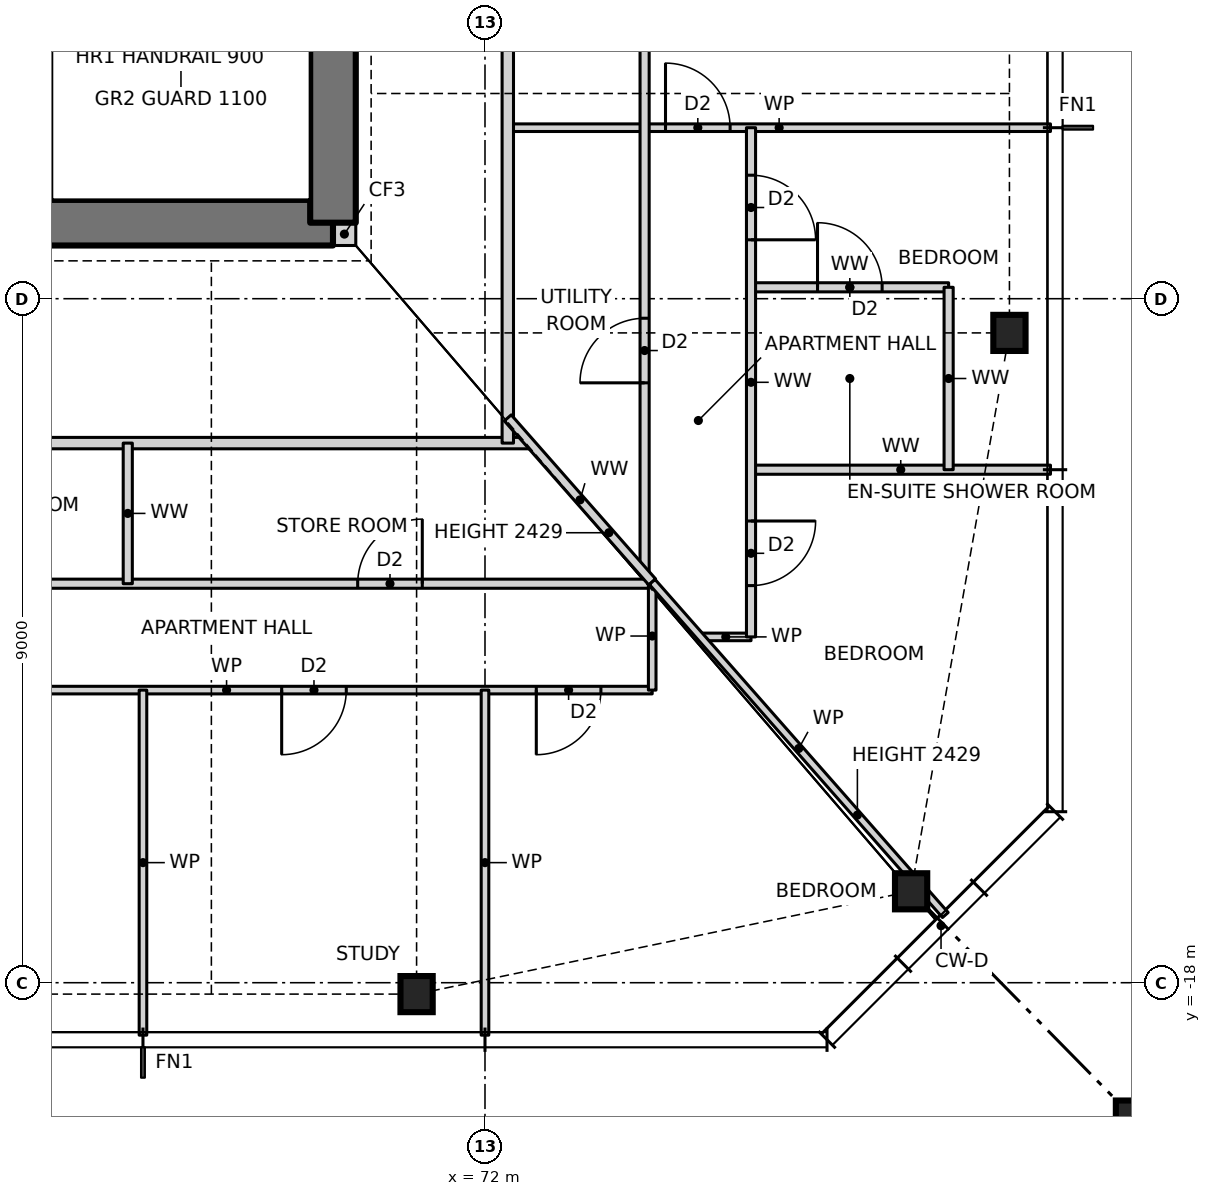
"""IFC4 building model, lengths in metres.
Left out: names, types, materials, properties, quantities, classifications, styles, units other than length and angle.
Written with IfcOpenShell. Run it as: python <this file> out.ifc"""

import sys

from ifc_helpers import new_model, si_unit, direction, frame, frame_2d, origin, origin_2d, place, context, subcontext, project, spatial, rectangle, hollow_rectangle, i_section, extrude, element, fill, save


model = new_model("IFC4")
c1 = context("Model", 3, precision=1e-05, world=origin(), true_north=direction((0.0, 1.0)))
c2 = subcontext(c1, "Body", "Model", "MODEL_VIEW")
j1 = project(units=[si_unit("LENGTHUNIT", "METRE"), si_unit("PLANEANGLEUNIT", "RADIAN")], contexts=[c1])
p1 = place(None, origin())
s1 = spatial("IfcSite", under=j1, at=p1, CompositionType="ELEMENT")
p2 = place(p1, origin())
s2 = spatial("IfcBuilding", under=s1, at=p2, CompositionType="ELEMENT")
p3 = place(p2, frame((0.0, 0.0, 22.0)))
s3 = spatial("IfcBuildingStorey", under=s2, at=p3, CompositionType="ELEMENT", Elevation=22.0)
for number, where, z_axis, x_axis in (
    (1, (71.1, -18.15, 0.0), (0.0, 0.0, 1.0), (1.0, 0.0, 0.0)),
    (2, (77.606, -16.797, 0.0), (0.0, 0.0, 1.0), (1.0, 0.0, 0.0)),
    (3, (78.9, -9.45, 0.0), (0.0, 0.0, 1.0), (1.0, 0.0, 0.0)),
):
    element("IfcColumn", number, at=place(p3, frame(where, z_axis=z_axis, x_axis=x_axis)), inside=s3, PredefinedType="COLUMN", context=c2, shape_type="SweptSolid", body=[
        extrude(i_section(OverallWidth=0.424, OverallDepth=0.475, WebThickness=0.048, FlangeThickness=0.077, at=origin_2d()), origin(), (0.0, 0.0, 1.0), 3.5),
    ])
p4 = place(p3, frame((80.9, -20.15, 0.0), z_axis=(0.0, 0.0, 1.0), x_axis=(1.0, 0.0, 0.0)))
e4 = element("IfcColumn", 4, at=p4, inside=s3, PredefinedType="COLUMN", context=c2, shape_type="SweptSolid", body=[
    extrude(hollow_rectangle(XDim=1.2, YDim=1.2, WallThickness=0.07, at=origin_2d()), origin(), (0.0, 0.0, 1.0), 3.5),
])
p5 = place(p3, frame((70.0, -8.15, 0.0), z_axis=(0.0, 0.0, 1.0), x_axis=(1.0, 0.0, 0.0)))
e5 = element("IfcWall", 5, at=p5, inside=s3, PredefinedType="SOLIDWALL", context=c2, shape_type="SweptSolid", body=[
    extrude(rectangle(XDim=0.3, YDim=0.3, at=frame_2d((0.15, 0.0))), origin(), (0.0, 0.0, 1.0), 3.5),
])
p6 = place(p3, frame((56.0, -8.0, 0.0), z_axis=(0.0, 0.0, 1.0), x_axis=(1.0, 0.0, 0.0)))
e6 = element("IfcWall", 6, at=p6, inside=s3, PredefinedType="SHEAR", context=c2, shape_type="SweptSolid", body=[
    extrude(rectangle(XDim=14.0, YDim=0.6, at=frame_2d((7.0, 0.0))), origin(), (0.0, 0.0, 1.0), 3.5),
])
p7 = place(p6, frame((2.7, 0.0, 0.0)))
e7 = element("IfcOpeningElement", 7, at=p7, cuts=e6, PredefinedType="OPENING", context=c2, shape_type="SweptSolid", body=[
    extrude(rectangle(XDim=0.9, YDim=2.1, at=frame_2d((0.45, 1.05))), frame((0.0, 0.31, 0.0), z_axis=(0.0, -1.0, 0.0), x_axis=(1.0, 0.0, 0.0)), (0.0, 0.0, 1.0), 0.62),
])
p8 = place(p6, frame((7.7, 0.0, 0.0)))
e8 = element("IfcOpeningElement", 8, at=p8, cuts=e6, PredefinedType="OPENING", context=c2, shape_type="SweptSolid", body=[
    extrude(rectangle(XDim=0.9, YDim=2.1, at=frame_2d((0.45, 1.05))), frame((0.0, 0.31, 0.0), z_axis=(0.0, -1.0, 0.0), x_axis=(1.0, 0.0, 0.0)), (0.0, 0.0, 1.0), 0.62),
])
p9 = place(p3, frame((70.0, -8.0, 0.0), z_axis=(0.0, 0.0, 1.0), x_axis=(0.0, 1.0, 0.0)))
e9 = element("IfcWall", 9, at=p9, inside=s3, PredefinedType="SHEAR", context=c2, shape_type="SweptSolid", body=[
    extrude(rectangle(XDim=16.0, YDim=0.6, at=frame_2d((8.0, 0.0))), origin(), (0.0, 0.0, 1.0), 3.5),
])
p10 = place(p9, frame((7.5, 0.0, 0.0)))
e10 = element("IfcOpeningElement", 10, at=p10, cuts=e9, PredefinedType="OPENING", context=c2, shape_type="SweptSolid", body=[
    extrude(rectangle(XDim=1.0, YDim=2.1, at=frame_2d((0.5, 1.05))), frame((0.0, 0.31, 0.0), z_axis=(0.0, -1.0, 0.0), x_axis=(1.0, 0.0, 0.0)), (0.0, 0.0, 1.0), 0.62),
])
p11 = place(p3, frame((63.0, -14.15, 0.0), z_axis=(0.0, 0.0, 1.0), x_axis=(1.0, 0.0, 0.0)))
e11 = element("IfcWall", 11, at=p11, inside=s3, PredefinedType="PARTITIONING", context=c2, shape_type="SweptSolid", body=[
    extrude(rectangle(XDim=11.2, YDim=0.1, at=frame_2d((5.6, 0.0))), origin(), (0.0, 0.0, 1.0), 3.27),
])
p12 = place(p11, frame((1.825, 0.0, 0.0)))
e12 = element("IfcOpeningElement", 12, at=p12, cuts=e11, PredefinedType="OPENING", context=c2, shape_type="SweptSolid", body=[
    extrude(rectangle(XDim=0.85, YDim=2.1, at=frame_2d((0.425, 1.05))), frame((0.0, 0.06, 0.0), z_axis=(0.0, -1.0, 0.0), x_axis=(1.0, 0.0, 0.0)), (0.0, 0.0, 1.0), 0.12),
])
p13 = place(p11, frame((6.325, 0.0, 0.0)))
e13 = element("IfcOpeningElement", 13, at=p13, cuts=e11, PredefinedType="OPENING", context=c2, shape_type="SweptSolid", body=[
    extrude(rectangle(XDim=0.85, YDim=2.1, at=frame_2d((0.425, 1.05))), frame((0.0, 0.06, 0.0), z_axis=(0.0, -1.0, 0.0), x_axis=(1.0, 0.0, 0.0)), (0.0, 0.0, 1.0), 0.12),
])
p14 = place(p11, frame((9.675, 0.0, 0.0)))
e14 = element("IfcOpeningElement", 14, at=p14, cuts=e11, PredefinedType="OPENING", context=c2, shape_type="SweptSolid", body=[
    extrude(rectangle(XDim=0.85, YDim=2.1, at=frame_2d((0.425, 1.05))), frame((0.0, 0.06, 0.0), z_axis=(0.0, -1.0, 0.0), x_axis=(1.0, 0.0, 0.0)), (0.0, 0.0, 1.0), 0.12),
])
p15 = place(p3, frame((74.836, -13.45, 0.0), z_axis=(0.0, 0.0, 1.0), x_axis=(1.0, 0.0, 0.0)))
e15 = element("IfcWall", 15, at=p15, inside=s3, PredefinedType="PARTITIONING", context=c2, shape_type="SweptSolid", body=[
    extrude(rectangle(XDim=0.664, YDim=0.1, at=frame_2d((0.332, 0.0))), origin(), (0.0, 0.0, 1.0), 3.27),
])
p16 = place(p3, frame((54.0, -12.75, 0.0), z_axis=(0.0, 0.0, 1.0), x_axis=(1.0, 0.0, 0.0)))
e16 = element("IfcWall", 16, at=p16, inside=s3, PredefinedType="PARTITIONING", context=c2, shape_type="SweptSolid", body=[
    extrude(rectangle(XDim=20.2, YDim=0.12, at=frame_2d((10.1, 0.0))), origin(), (0.0, 0.0, 1.0), 3.27),
])
p17 = place(p16, frame((1.375, 0.0, 0.0)))
e17 = element("IfcOpeningElement", 17, at=p17, cuts=e16, PredefinedType="OPENING", context=c2, shape_type="SweptSolid", body=[
    extrude(rectangle(XDim=0.85, YDim=2.1, at=frame_2d((0.425, 1.05))), frame((0.0, 0.07, 0.0), z_axis=(0.0, -1.0, 0.0), x_axis=(1.0, 0.0, 0.0)), (0.0, 0.0, 1.0), 0.14),
])
p18 = place(p16, frame((4.575, 0.0, 0.0)))
e18 = element("IfcOpeningElement", 18, at=p18, cuts=e16, PredefinedType="OPENING", context=c2, shape_type="SweptSolid", body=[
    extrude(rectangle(XDim=0.85, YDim=2.1, at=frame_2d((0.425, 1.05))), frame((0.0, 0.07, 0.0), z_axis=(0.0, -1.0, 0.0), x_axis=(1.0, 0.0, 0.0)), (0.0, 0.0, 1.0), 0.14),
])
p19 = place(p16, frame((10.725, 0.0, 0.0)))
e19 = element("IfcOpeningElement", 19, at=p19, cuts=e16, PredefinedType="OPENING", context=c2, shape_type="SweptSolid", body=[
    extrude(rectangle(XDim=0.85, YDim=2.1, at=frame_2d((0.425, 1.05))), frame((0.0, 0.07, 0.0), z_axis=(0.0, -1.0, 0.0), x_axis=(1.0, 0.0, 0.0)), (0.0, 0.0, 1.0), 0.14),
])
p20 = place(p16, frame((16.325, 0.0, 0.0)))
e20 = element("IfcOpeningElement", 20, at=p20, cuts=e16, PredefinedType="OPENING", context=c2, shape_type="SweptSolid", body=[
    extrude(rectangle(XDim=0.85, YDim=2.1, at=frame_2d((0.425, 1.05))), frame((0.0, 0.07, 0.0), z_axis=(0.0, -1.0, 0.0), x_axis=(1.0, 0.0, 0.0)), (0.0, 0.0, 1.0), 0.14),
])
p21 = place(p3, frame((75.5, -11.25, 0.0), z_axis=(0.0, 0.0, 1.0), x_axis=(1.0, 0.0, 0.0)))
e21 = element("IfcWall", 21, at=p21, inside=s3, PredefinedType="PARTITIONING", context=c2, shape_type="SweptSolid", body=[
    extrude(rectangle(XDim=3.94, YDim=0.12, at=frame_2d((1.97, 0.0))), origin(), (0.0, 0.0, 1.0), 3.27),
])
p22 = place(p3, frame((53.408, -10.9, 0.0), z_axis=(0.0, 0.0, 1.0), x_axis=(1.0, 0.0, 0.0)))
e22 = element("IfcWall", 22, at=p22, inside=s3, PredefinedType="PARTITIONING", context=c2, shape_type="SweptSolid", body=[
    extrude(rectangle(XDim=19.184, YDim=0.15, at=frame_2d((9.592, 0.0))), origin(), (0.0, 0.0, 1.0), 3.27),
])
p23 = place(p22, frame((5.092, 0.0, 0.0)))
e23 = element("IfcOpeningElement", 23, at=p23, cuts=e22, PredefinedType="OPENING", context=c2, shape_type="SweptSolid", body=[
    extrude(rectangle(XDim=1.0, YDim=2.1, at=frame_2d((0.5, 1.05))), frame((0.0, 0.085, 0.0), z_axis=(0.0, -1.0, 0.0), x_axis=(1.0, 0.0, 0.0)), (0.0, 0.0, 1.0), 0.17),
])
p24 = place(p3, frame((75.5, -8.85, 0.0), z_axis=(0.0, 0.0, 1.0), x_axis=(1.0, 0.0, 0.0)))
e24 = element("IfcWall", 24, at=p24, inside=s3, PredefinedType="PARTITIONING", context=c2, shape_type="SweptSolid", body=[
    extrude(rectangle(XDim=2.6, YDim=0.12, at=frame_2d((1.3, 0.0))), origin(), (0.0, 0.0, 1.0), 3.27),
])
p25 = place(p24, frame((0.875, 0.0, 0.0)))
e25 = element("IfcOpeningElement", 25, at=p25, cuts=e24, PredefinedType="OPENING", context=c2, shape_type="SweptSolid", body=[
    extrude(rectangle(XDim=0.85, YDim=2.1, at=frame_2d((0.425, 1.05))), frame((0.0, 0.07, 0.0), z_axis=(0.0, -1.0, 0.0), x_axis=(1.0, 0.0, 0.0)), (0.0, 0.0, 1.0), 0.14),
])
p26 = place(p3, frame((72.3, -6.75, 0.0), z_axis=(0.0, 0.0, 1.0), x_axis=(1.0, 0.0, 0.0)))
e26 = element("IfcWall", 26, at=p26, inside=s3, PredefinedType="PARTITIONING", context=c2, shape_type="SweptSolid", body=[
    extrude(rectangle(XDim=7.14, YDim=0.1, at=frame_2d((3.57, 0.0))), origin(), (0.0, 0.0, 1.0), 3.27),
])
p27 = place(p26, frame((2.075, 0.0, 0.0)))
e27 = element("IfcOpeningElement", 27, at=p27, cuts=e26, PredefinedType="OPENING", context=c2, shape_type="SweptSolid", body=[
    extrude(rectangle(XDim=0.85, YDim=2.1, at=frame_2d((0.425, 1.05))), frame((0.0, 0.06, 0.0), z_axis=(0.0, -1.0, 0.0), x_axis=(1.0, 0.0, 0.0)), (0.0, 0.0, 1.0), 0.12),
])
p28 = place(p3, frame((78.1, -11.25, 0.0), z_axis=(0.0, 0.0, 1.0), x_axis=(0.0, 1.0, 0.0)))
e28 = element("IfcWall", 28, at=p28, inside=s3, PredefinedType="PARTITIONING", context=c2, shape_type="SweptSolid", body=[
    extrude(rectangle(XDim=2.4, YDim=0.12, at=frame_2d((1.2, 0.0))), origin(), (0.0, 0.0, 1.0), 3.27),
])
p29 = place(p3, frame((75.5, -13.45, 0.0), z_axis=(0.0, 0.0, 1.0), x_axis=(0.0, 1.0, 0.0)))
e29 = element("IfcWall", 29, at=p29, inside=s3, PredefinedType="PARTITIONING", context=c2, shape_type="SweptSolid", body=[
    extrude(rectangle(XDim=6.7, YDim=0.12, at=frame_2d((3.35, 0.0))), origin(), (0.0, 0.0, 1.0), 3.27),
])
p30 = place(p29, frame((5.225, 0.0, 0.0)))
e30 = element("IfcOpeningElement", 30, at=p30, cuts=e29, PredefinedType="OPENING", context=c2, shape_type="SweptSolid", body=[
    extrude(rectangle(XDim=0.85, YDim=2.1, at=frame_2d((0.425, 1.05))), frame((0.0, 0.07, 0.0), z_axis=(0.0, -1.0, 0.0), x_axis=(1.0, 0.0, 0.0)), (0.0, 0.0, 1.0), 0.14),
])
p31 = place(p29, frame((0.675, 0.0, 0.0)))
e31 = element("IfcOpeningElement", 31, at=p31, cuts=e29, PredefinedType="OPENING", context=c2, shape_type="SweptSolid", body=[
    extrude(rectangle(XDim=0.85, YDim=2.1, at=frame_2d((0.425, 1.05))), frame((0.0, 0.07, 0.0), z_axis=(0.0, -1.0, 0.0), x_axis=(1.0, 0.0, 0.0)), (0.0, 0.0, 1.0), 0.14),
])
p32 = place(p3, frame((74.2, -14.15, 0.0), z_axis=(0.0, 0.0, 1.0), x_axis=(0.0, 1.0, 0.0)))
e32 = element("IfcWall", 32, at=p32, inside=s3, PredefinedType="PARTITIONING", context=c2, shape_type="SweptSolid", body=[
    extrude(rectangle(XDim=1.423, YDim=0.1, at=frame_2d((0.711, 0.0))), origin(), (0.0, 0.0, 1.0), 3.27),
])
p33 = place(p3, frame((74.1, -12.614, 0.0), z_axis=(0.0, 0.0, 1.0), x_axis=(0.0, 1.0, 0.0)))
e33 = element("IfcWall", 33, at=p33, inside=s3, PredefinedType="PARTITIONING", context=c2, shape_type="SweptSolid", body=[
    extrude(rectangle(XDim=25.228, YDim=0.12, at=frame_2d((12.614, 0.0))), origin(), (0.0, 0.0, 1.0), 3.27),
])
p34 = place(p33, frame((7.239, 0.0, 0.0)))
e34 = element("IfcOpeningElement", 34, at=p34, cuts=e33, PredefinedType="OPENING", context=c2, shape_type="SweptSolid", body=[
    extrude(rectangle(XDim=0.85, YDim=2.1, at=frame_2d((0.425, 1.05))), frame((0.0, 0.07, 0.0), z_axis=(0.0, -1.0, 0.0), x_axis=(1.0, 0.0, 0.0)), (0.0, 0.0, 1.0), 0.14),
])
p35 = place(p33, frame((10.439, 0.0, 0.0)))
e35 = element("IfcOpeningElement", 35, at=p35, cuts=e33, PredefinedType="OPENING", context=c2, shape_type="SweptSolid", body=[
    extrude(rectangle(XDim=0.85, YDim=2.1, at=frame_2d((0.425, 1.05))), frame((0.0, 0.07, 0.0), z_axis=(0.0, -1.0, 0.0), x_axis=(1.0, 0.0, 0.0)), (0.0, 0.0, 1.0), 0.14),
])
p36 = place(p33, frame((2.507, 0.0, 0.0)))
e36 = element("IfcOpeningElement", 36, at=p36, cuts=e33, PredefinedType="OPENING", context=c2, shape_type="SweptSolid", body=[
    extrude(rectangle(XDim=0.85, YDim=2.1, at=frame_2d((0.425, 1.05))), frame((0.0, 0.07, 0.0), z_axis=(0.0, -1.0, 0.0), x_axis=(1.0, 0.0, 0.0)), (0.0, 0.0, 1.0), 0.14),
])
p37 = place(p33, frame((16.639, 0.0, 0.0)))
e37 = element("IfcOpeningElement", 37, at=p37, cuts=e33, PredefinedType="OPENING", context=c2, shape_type="SweptSolid", body=[
    extrude(rectangle(XDim=0.85, YDim=2.1, at=frame_2d((0.425, 1.05))), frame((0.0, 0.07, 0.0), z_axis=(0.0, -1.0, 0.0), x_axis=(1.0, 0.0, 0.0)), (0.0, 0.0, 1.0), 0.14),
])
p38 = place(p33, frame((21.821, 0.0, 0.0)))
e38 = element("IfcOpeningElement", 38, at=p38, cuts=e33, PredefinedType="OPENING", context=c2, shape_type="SweptSolid", body=[
    extrude(rectangle(XDim=0.85, YDim=2.1, at=frame_2d((0.425, 1.05))), frame((0.0, 0.07, 0.0), z_axis=(0.0, -1.0, 0.0), x_axis=(1.0, 0.0, 0.0)), (0.0, 0.0, 1.0), 0.14),
])
p39 = place(p3, frame((72.3, -10.9, 0.0), z_axis=(0.0, 0.0, 1.0), x_axis=(0.0, 1.0, 0.0)))
e39 = element("IfcWall", 39, at=p39, inside=s3, PredefinedType="PARTITIONING", context=c2, shape_type="SweptSolid", body=[
    extrude(rectangle(XDim=21.468, YDim=0.15, at=frame_2d((10.734, 0.0))), origin(), (0.0, 0.0, 1.0), 3.27),
])
p40 = place(p39, frame((8.65, 0.0, 0.0)))
e40 = element("IfcOpeningElement", 40, at=p40, cuts=e39, PredefinedType="OPENING", context=c2, shape_type="SweptSolid", body=[
    extrude(rectangle(XDim=1.0, YDim=2.1, at=frame_2d((0.5, 1.05))), frame((0.0, 0.085, 0.0), z_axis=(0.0, -1.0, 0.0), x_axis=(1.0, 0.0, 0.0)), (0.0, 0.0, 1.0), 0.17),
])
for number, where, z_axis, x_axis in (
    (41, (72.0, -18.69, 0.0), (0.0, 0.0, 1.0), (0.0, 1.0, 0.0)),
    (42, (67.5, -18.69, 0.0), (0.0, 0.0, 1.0), (0.0, 1.0, 0.0)),
):
    element("IfcWall", number, at=place(p3, frame(where, z_axis=z_axis, x_axis=x_axis)), inside=s3, PredefinedType="PARTITIONING", context=c2, shape_type="SweptSolid", body=[
        extrude(rectangle(XDim=4.54, YDim=0.1, at=frame_2d((2.27, 0.0))), origin(), (0.0, 0.0, 1.0), 3.27),
    ])
p41 = place(p3, frame((67.3, -12.75, 0.0), z_axis=(0.0, 0.0, 1.0), x_axis=(0.0, 1.0, 0.0)))
e43 = element("IfcWall", 43, at=p41, inside=s3, PredefinedType="PARTITIONING", context=c2, shape_type="SweptSolid", body=[
    extrude(rectangle(XDim=1.85, YDim=0.12, at=frame_2d((0.925, 0.0))), origin(), (0.0, 0.0, 1.0), 3.27),
])
p42 = place(p3, frame((66.3, -7.64, 0.0), z_axis=(0.0, 0.0, 1.0), x_axis=(0.0, 1.0, 0.0)))
e44 = element("IfcWall", 44, at=p42, inside=s3, PredefinedType="SOLIDWALL", context=c2, shape_type="SweptSolid", body=[
    extrude(rectangle(XDim=11.49, YDim=0.2, at=frame_2d((5.745, 0.0))), origin(), (0.0, 0.0, 1.0), 3.5),
])
p43 = place(p42, frame((7.04, 0.0, 0.0)))
e45 = element("IfcOpeningElement", 45, at=p43, cuts=e44, PredefinedType="OPENING", context=c2, shape_type="SweptSolid", body=[
    extrude(rectangle(XDim=1.2, YDim=2.1, at=frame_2d((0.6, 1.05))), frame((0.0, 0.11, 0.0), z_axis=(0.0, -1.0, 0.0), x_axis=(1.0, 0.0, 0.0)), (0.0, 0.0, 1.0), 0.22),
])
p44 = place(p3, frame((74.2, -12.727, 0.0), z_axis=(0.0, 0.0, 1.0), x_axis=(-0.66059344937, 0.75074382758, 0.0)))
e46 = element("IfcWall", 46, at=p44, inside=s3, PredefinedType="PARTITIONING", context=c2, shape_type="SweptSolid", body=[
    extrude(rectangle(XDim=2.876, YDim=0.12, at=frame_2d((1.438, 0.0))), origin(), (0.0, 0.0, 1.0), 2.429),
])
p45 = place(p3, frame((78.057, -17.109, 0.0), z_axis=(0.0, 0.0, 1.0), x_axis=(-0.660654290516, 0.750690287951, 0.0)))
e47 = element("IfcWall", 47, at=p45, inside=s3, PredefinedType="PARTITIONING", context=c2, shape_type="SweptSolid", body=[
    extrude(rectangle(XDim=5.838, YDim=0.1, at=frame_2d((2.919, 0.0))), origin(), (0.0, 0.0, 1.0), 2.429),
])
p46 = place(p13, frame((0.85, 0.0, 0.0), z_axis=(0.0, 0.0, 1.0), x_axis=(-1.0, 0.0, 0.0)))
e48 = element("IfcDoor", 48, at=p46, inside=s3, OperationType="SINGLE_SWING_RIGHT", PredefinedType="DOOR", context=c2, shape_type="SweptSolid", body=[
    extrude(rectangle(XDim=0.85, YDim=2.1, at=frame_2d((0.425, 1.05))), frame((0.0, 0.025, 0.0), z_axis=(0.0, -1.0, 0.0), x_axis=(1.0, 0.0, 0.0)), (0.0, 0.0, 1.0), 0.05),
])
fill(e13, e48)
p47 = place(p14, frame((0.85, 0.0, 0.0), z_axis=(0.0, 0.0, 1.0), x_axis=(-1.0, 0.0, 0.0)))
e49 = element("IfcDoor", 49, at=p47, inside=s3, OperationType="SINGLE_SWING_RIGHT", PredefinedType="DOOR", context=c2, shape_type="SweptSolid", body=[
    extrude(rectangle(XDim=0.85, YDim=2.1, at=frame_2d((0.425, 1.05))), frame((0.0, 0.025, 0.0), z_axis=(0.0, -1.0, 0.0), x_axis=(1.0, 0.0, 0.0)), (0.0, 0.0, 1.0), 0.05),
])
fill(e14, e49)
p48 = place(p20, origin())
e50 = element("IfcDoor", 50, at=p48, inside=s3, OperationType="SINGLE_SWING_RIGHT", PredefinedType="DOOR", context=c2, shape_type="SweptSolid", body=[
    extrude(rectangle(XDim=0.85, YDim=2.1, at=frame_2d((0.425, 1.05))), frame((0.0, 0.025, 0.0), z_axis=(0.0, -1.0, 0.0), x_axis=(1.0, 0.0, 0.0)), (0.0, 0.0, 1.0), 0.05),
])
fill(e20, e50)
p49 = place(p27, origin())
e51 = element("IfcDoor", 51, at=p49, inside=s3, OperationType="SINGLE_SWING_LEFT", PredefinedType="DOOR", context=c2, shape_type="SweptSolid", body=[
    extrude(rectangle(XDim=0.85, YDim=2.1, at=frame_2d((0.425, 1.05))), frame((0.0, 0.025, 0.0), z_axis=(0.0, -1.0, 0.0), x_axis=(1.0, 0.0, 0.0)), (0.0, 0.0, 1.0), 0.05),
])
fill(e27, e51)
p50 = place(p25, origin())
e52 = element("IfcDoor", 52, at=p50, inside=s3, OperationType="SINGLE_SWING_LEFT", PredefinedType="DOOR", context=c2, shape_type="SweptSolid", body=[
    extrude(rectangle(XDim=0.85, YDim=2.1, at=frame_2d((0.425, 1.05))), frame((0.0, 0.025, 0.0), z_axis=(0.0, -1.0, 0.0), x_axis=(1.0, 0.0, 0.0)), (0.0, 0.0, 1.0), 0.05),
])
fill(e25, e52)
p51 = place(p30, frame((0.85, 0.0, 0.0), z_axis=(0.0, 0.0, 1.0), x_axis=(-1.0, 0.0, 0.0)))
e53 = element("IfcDoor", 53, at=p51, inside=s3, OperationType="SINGLE_SWING_RIGHT", PredefinedType="DOOR", context=c2, shape_type="SweptSolid", body=[
    extrude(rectangle(XDim=0.85, YDim=2.1, at=frame_2d((0.425, 1.05))), frame((0.0, 0.025, 0.0), z_axis=(0.0, -1.0, 0.0), x_axis=(1.0, 0.0, 0.0)), (0.0, 0.0, 1.0), 0.05),
])
fill(e30, e53)
p52 = place(p31, frame((0.85, 0.0, 0.0), z_axis=(0.0, 0.0, 1.0), x_axis=(-1.0, 0.0, 0.0)))
e54 = element("IfcDoor", 54, at=p52, inside=s3, OperationType="SINGLE_SWING_LEFT", PredefinedType="DOOR", context=c2, shape_type="SweptSolid", body=[
    extrude(rectangle(XDim=0.85, YDim=2.1, at=frame_2d((0.425, 1.05))), frame((0.0, 0.025, 0.0), z_axis=(0.0, -1.0, 0.0), x_axis=(1.0, 0.0, 0.0)), (0.0, 0.0, 1.0), 0.05),
])
fill(e31, e54)
p53 = place(p36, origin())
e55 = element("IfcDoor", 55, at=p53, inside=s3, OperationType="SINGLE_SWING_LEFT", PredefinedType="DOOR", context=c2, shape_type="SweptSolid", body=[
    extrude(rectangle(XDim=0.85, YDim=2.1, at=frame_2d((0.425, 1.05))), frame((0.0, 0.025, 0.0), z_axis=(0.0, -1.0, 0.0), x_axis=(1.0, 0.0, 0.0)), (0.0, 0.0, 1.0), 0.05),
])
fill(e36, e55)
save(model, sys.argv[1])
